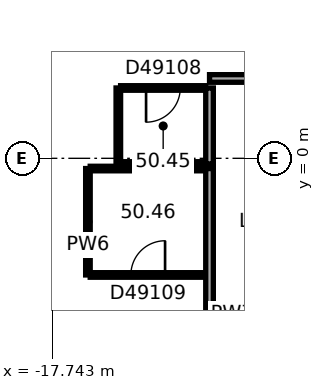
"""IFC4 building model, lengths in metres.
Left out: names, types, materials, properties, quantities, classifications, styles, units other than length and angle.
Written with IfcOpenShell. Run it as: python <this file> out.ifc"""

import sys

from ifc_helpers import new_model, si_unit, direction, frame, frame_2d, origin, place, context, subcontext, project, spatial, rectangle, extrude, element, fill, save


model = new_model("IFC4")
c1 = context("Model", 3, precision=1e-05, world=origin(), true_north=direction((0.0, 1.0)))
c2 = subcontext(c1, "Body", "Model", "MODEL_VIEW")
j1 = project(units=[si_unit("LENGTHUNIT", "METRE"), si_unit("PLANEANGLEUNIT", "RADIAN")], contexts=[c1])
p1 = place(None, origin())
s1 = spatial("IfcSite", under=j1, at=p1, CompositionType="ELEMENT")
p2 = place(p1, origin())
s2 = spatial("IfcBuilding", under=s1, at=p2, CompositionType="ELEMENT")
p3 = place(p2, frame((0.0, 0.0, 202.1)))
s3 = spatial("IfcBuildingStorey", under=s2, at=p3, CompositionType="ELEMENT", Elevation=202.1)
p4 = place(p3, frame((-16.801, -3.069, 0.0), z_axis=(0.0, 0.0, 1.0), x_axis=(0.0, 1.0, 0.0)))
e1 = element("IfcWall", 1, at=p4, inside=s3, PredefinedType="PARTITIONING", context=c2, shape_type="SweptSolid", body=[
    extrude(rectangle(XDim=2.8, YDim=0.12, at=frame_2d((1.4, 0.0))), origin(), (0.0, 0.0, 1.0), 3.35),
])
p5 = place(p3, frame((-16.741, -0.269, 0.0), z_axis=(0.0, 0.0, 1.0), x_axis=(1.0, 0.0, 0.0)))
e2 = element("IfcWall", 2, at=p5, inside=s3, PredefinedType="PARTITIONING", context=c2, shape_type="SweptSolid", body=[
    extrude(rectangle(XDim=3.04, YDim=0.12, at=frame_2d((1.52, 0.0))), origin(), (0.0, 0.0, 1.0), 3.35),
])
p6 = place(p3, frame((-16.001, -0.149, 0.0), z_axis=(0.0, 0.0, 1.0), x_axis=(0.0, 1.0, 0.0)))
e3 = element("IfcWall", 3, at=p6, inside=s3, PredefinedType="PARTITIONING", context=c2, shape_type="SweptSolid", body=[
    extrude(rectangle(XDim=2.0, YDim=0.12, at=frame_2d((1.0, 0.0))), origin(), (0.0, 0.0, 1.0), 3.35),
])
p7 = place(p3, frame((-15.941, 1.851, 0.0), z_axis=(0.0, 0.0, 1.0), x_axis=(1.0, 0.0, 0.0)))
e4 = element("IfcWall", 4, at=p7, inside=s3, PredefinedType="PARTITIONING", context=c2, shape_type="SweptSolid", body=[
    extrude(rectangle(XDim=2.24, YDim=0.12, at=frame_2d((1.12, 0.0))), origin(), (0.0, 0.0, 1.0), 3.35),
])
p8 = place(p7, frame((0.67, 0.0, 0.0)))
e5 = element("IfcOpeningElement", 5, at=p8, cuts=e4, PredefinedType="OPENING", context=c2, shape_type="SweptSolid", body=[
    extrude(rectangle(XDim=0.9, YDim=2.1, at=frame_2d((0.45, 1.05))), frame((0.0, 0.07, 0.0), z_axis=(0.0, -1.0, 0.0), x_axis=(1.0, 0.0, 0.0)), (0.0, 0.0, 1.0), 0.14),
])
p9 = place(p3, frame((-13.701, -3.069, 0.0), z_axis=(0.0, 0.0, 1.0), x_axis=(-1.0, 0.0, 0.0)))
e6 = element("IfcWall", 6, at=p9, inside=s3, PredefinedType="PARTITIONING", context=c2, shape_type="SweptSolid", body=[
    extrude(rectangle(XDim=3.04, YDim=0.12, at=frame_2d((1.52, 0.0))), origin(), (0.0, 0.0, 1.0), 3.35),
])
p10 = place(p9, frame((1.07, 0.0, 0.0)))
e7 = element("IfcOpeningElement", 7, at=p10, cuts=e6, PredefinedType="OPENING", context=c2, shape_type="SweptSolid", body=[
    extrude(rectangle(XDim=0.9, YDim=2.1, at=frame_2d((0.45, 1.05))), frame((0.0, 0.07, 0.0), z_axis=(0.0, -1.0, 0.0), x_axis=(1.0, 0.0, 0.0)), (0.0, 0.0, 1.0), 0.14),
])
p11 = place(p3, frame((-13.701, -0.149, 0.0), z_axis=(0.0, 0.0, 1.0), x_axis=(-1.0, 0.0, 0.0)))
e8 = element("IfcWall", 8, at=p11, inside=s3, PredefinedType="PARTITIONING", context=c2, shape_type="SweptSolid", body=[
    extrude(rectangle(XDim=2.24, YDim=0.12, at=frame_2d((1.12, 0.0))), origin(), (0.0, 0.0, 1.0), 3.35),
])
p12 = place(p3, frame((-13.601, -4.101, 0.0), z_axis=(0.0, 0.0, 1.0), x_axis=(1.0, 0.0, 0.0)))
e9 = element("IfcWall", 9, at=p12, inside=s3, PredefinedType="PARTITIONING", context=c2, shape_type="SweptSolid", body=[
    extrude(rectangle(XDim=1.201, YDim=0.2, at=frame_2d((0.601, 0.0))), origin(), (0.0, 0.0, 1.0), 3.35),
])
p13 = place(p3, frame((-13.601, -0.269, 0.0), z_axis=(0.0, 0.0, 1.0), x_axis=(0.0, -1.0, 0.0)))
e10 = element("IfcWall", 10, at=p13, inside=s3, PredefinedType="PARTITIONING", context=c2, shape_type="SweptSolid", body=[
    extrude(rectangle(XDim=3.732, YDim=0.2, at=frame_2d((1.866, 0.0))), origin(), (0.0, 0.0, 1.0), 3.35),
])
p14 = place(p3, frame((-13.601, 1.851, 0.0), z_axis=(0.0, 0.0, 1.0), x_axis=(0.0, -1.0, 0.0)))
e11 = element("IfcWall", 11, at=p14, inside=s3, PredefinedType="PARTITIONING", context=c2, shape_type="SweptSolid", body=[
    extrude(rectangle(XDim=2.0, YDim=0.2, at=frame_2d((1.0, 0.0))), origin(), (0.0, 0.0, 1.0), 3.35),
])
p15 = place(p3, frame((-12.4, 2.101, 0.0), z_axis=(0.0, 0.0, 1.0), x_axis=(-1.0, 0.0, 0.0)))
e12 = element("IfcWall", 12, at=p15, inside=s3, PredefinedType="PARTITIONING", context=c2, shape_type="SweptSolid", body=[
    extrude(rectangle(XDim=1.201, YDim=0.2, at=frame_2d((0.601, 0.0))), origin(), (0.0, 0.0, 1.0), 3.35),
])
p16 = place(p8, origin())
e13 = element("IfcDoor", 13, at=p16, inside=s3, OperationType="SINGLE_SWING_LEFT", PredefinedType="DOOR", context=c2, shape_type="SweptSolid", body=[
    extrude(rectangle(XDim=0.9, YDim=2.1, at=frame_2d((0.45, 1.05))), frame((0.0, 0.025, 0.0), z_axis=(0.0, -1.0, 0.0), x_axis=(1.0, 0.0, 0.0)), (0.0, 0.0, 1.0), 0.05),
])
fill(e5, e13)
p17 = place(p10, origin())
e14 = element("IfcDoor", 14, at=p17, inside=s3, OperationType="SINGLE_SWING_LEFT", PredefinedType="DOOR", context=c2, shape_type="SweptSolid", body=[
    extrude(rectangle(XDim=0.9, YDim=2.1, at=frame_2d((0.45, 1.05))), frame((0.0, 0.025, 0.0), z_axis=(0.0, -1.0, 0.0), x_axis=(1.0, 0.0, 0.0)), (0.0, 0.0, 1.0), 0.05),
])
fill(e7, e14)
save(model, sys.argv[1])
